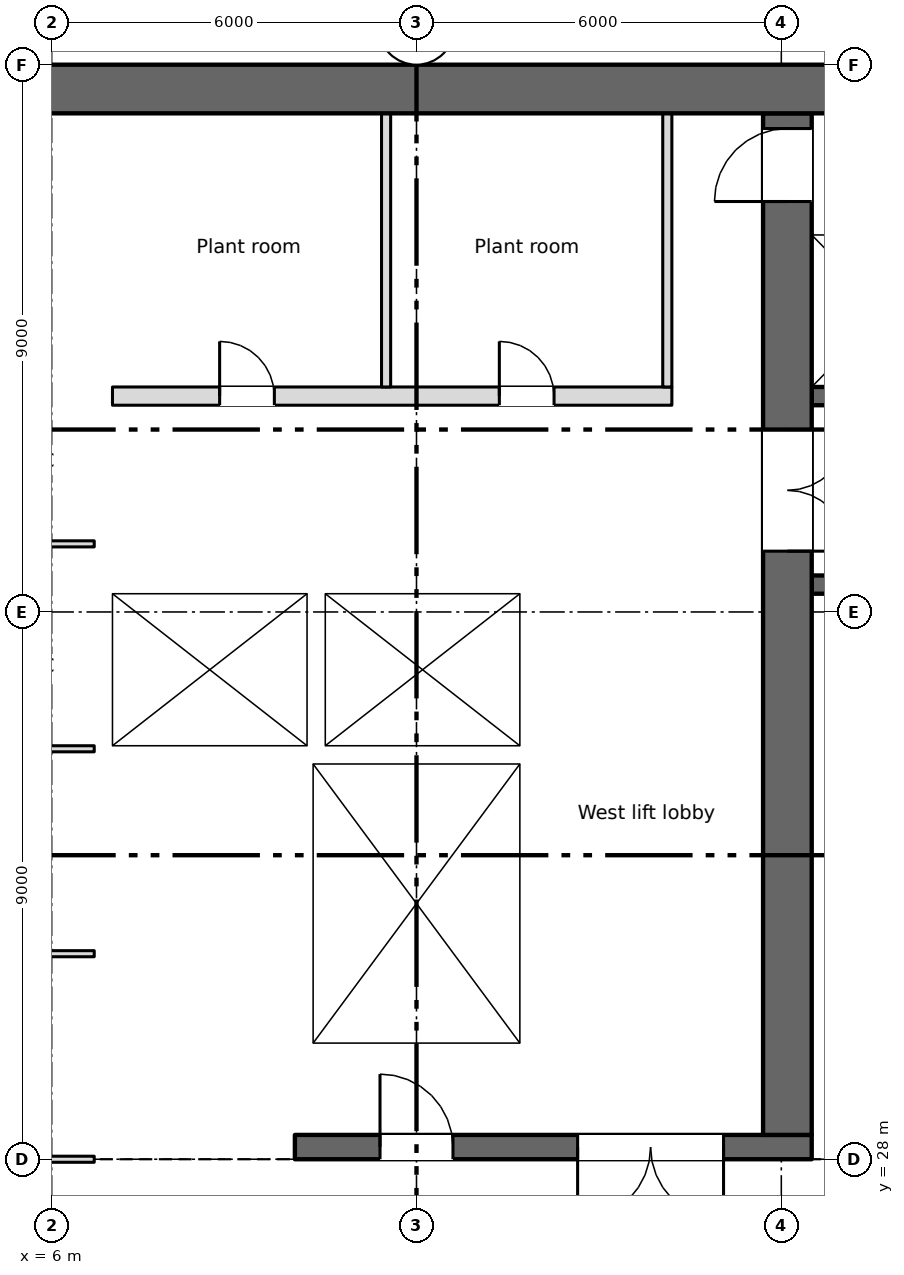
"""IFC4 building model, lengths in metres.
Left out: names, types, materials, properties, quantities, classifications, styles, units other than length and angle.
Written with IfcOpenShell. Run it as: python <this file> out.ifc"""

import sys

from ifc_helpers import new_model, si_unit, direction, frame, frame_2d, origin, place, context, subcontext, project, spatial, rectangle, extrude, element, fill, save


model = new_model("IFC4")
c1 = context("Model", 3, precision=1e-05, world=origin(), true_north=direction((0.0, 1.0)))
c2 = subcontext(c1, "Body", "Model", "MODEL_VIEW")
j1 = project(units=[si_unit("LENGTHUNIT", "METRE"), si_unit("PLANEANGLEUNIT", "RADIAN")], contexts=[c1])
p1 = place(None, origin())
s1 = spatial("IfcSite", under=j1, at=p1, CompositionType="ELEMENT")
p2 = place(p1, origin())
s2 = spatial("IfcBuilding", under=s1, at=p2, CompositionType="ELEMENT")
p3 = place(p2, frame((0.0, 0.0, 158.75)))
s3 = spatial("IfcBuildingStorey", under=s2, at=p3, CompositionType="ELEMENT", Elevation=158.75)
p4 = place(p3, frame((5.55, 45.6, 0.0), z_axis=(0.0, 0.0, 1.0), x_axis=(1.0, 0.0, 0.0)))
e1 = element("IfcWall", 1, at=p4, inside=s3, PredefinedType="SHEAR", context=c2, shape_type="SweptSolid", body=[
    extrude(rectangle(XDim=60.9, YDim=0.8, at=frame_2d((30.45, 0.0))), origin(), (0.0, 0.0, 1.0), 7.2),
])
p5 = place(p3, frame((6.85, 28.0, 0.0), z_axis=(0.0, 0.0, 1.0), x_axis=(0.0, 1.0, 0.0)))
e2 = element("IfcWall", 2, at=p5, inside=s3, PredefinedType="SHEAR", context=c2, shape_type="SweptSolid", body=[
    extrude(rectangle(XDim=0.4, YDim=0.3, at=frame_2d((0.2, 0.0))), origin(), (0.0, 0.0, 1.0), 7.2),
])
p6 = place(p3, frame((10.0, 28.2, 0.0), z_axis=(0.0, 0.0, 1.0), x_axis=(1.0, 0.0, 0.0)))
e3 = element("IfcWall", 3, at=p6, inside=s3, PredefinedType="SHEAR", context=c2, shape_type="SweptSolid", body=[
    extrude(rectangle(XDim=8.5, YDim=0.4, at=frame_2d((4.25, 0.0))), origin(), (0.0, 0.0, 1.0), 7.2),
])
p7 = place(p6, frame((1.4, 0.0, 0.0)))
e4 = element("IfcOpeningElement", 4, at=p7, cuts=e3, PredefinedType="OPENING", context=c2, shape_type="SweptSolid", body=[
    extrude(rectangle(XDim=1.2, YDim=2.1, at=frame_2d((0.6, 1.05))), frame((0.0, 0.21, 0.0), z_axis=(0.0, -1.0, 0.0), x_axis=(1.0, 0.0, 0.0)), (0.0, 0.0, 1.0), 0.42),
])
p8 = place(p6, frame((4.65, 0.0, 0.0)))
e5 = element("IfcOpeningElement", 5, at=p8, cuts=e3, PredefinedType="OPENING", context=c2, shape_type="SweptSolid", body=[
    extrude(rectangle(XDim=2.4, YDim=2.1, at=frame_2d((1.2, 1.05))), frame((0.0, 0.21, 0.0), z_axis=(0.0, -1.0, 0.0), x_axis=(1.0, 0.0, 0.0)), (0.0, 0.0, 1.0), 0.42),
])
p9 = place(p3, frame((6.85, 28.4, 0.0), z_axis=(0.0, 0.0, 1.0), x_axis=(0.0, 1.0, 0.0)))
e6 = element("IfcWall", 6, at=p9, inside=s3, PredefinedType="SHEAR", context=c2, shape_type="SweptSolid", body=[
    extrude(rectangle(XDim=16.8, YDim=0.3, at=frame_2d((8.4, 0.0))), origin(), (0.0, 0.0, 1.0), 7.2),
])
p10 = place(p3, frame((18.1, 28.4, 0.0), z_axis=(0.0, 0.0, 1.0), x_axis=(0.0, 1.0, 0.0)))
e7 = element("IfcWall", 7, at=p10, inside=s3, PredefinedType="SHEAR", context=c2, shape_type="SweptSolid", body=[
    extrude(rectangle(XDim=16.8, YDim=0.8, at=frame_2d((8.4, 0.0))), origin(), (0.0, 0.0, 1.0), 7.2),
])
p11 = place(p10, frame((9.6, 0.0, 0.0)))
e8 = element("IfcOpeningElement", 8, at=p11, cuts=e7, PredefinedType="OPENING", context=c2, shape_type="SweptSolid", body=[
    extrude(rectangle(XDim=2.0, YDim=2.1, at=frame_2d((1.0, 1.05))), frame((0.0, 0.41, 0.0), z_axis=(0.0, -1.0, 0.0), x_axis=(1.0, 0.0, 0.0)), (0.0, 0.0, 1.0), 0.82),
])
p12 = place(p10, frame((15.35, 0.0, 0.0)))
e9 = element("IfcOpeningElement", 9, at=p12, cuts=e7, PredefinedType="OPENING", context=c2, shape_type="SweptSolid", body=[
    extrude(rectangle(XDim=1.2, YDim=2.1, at=frame_2d((0.6, 1.05))), frame((0.0, 0.41, 0.0), z_axis=(0.0, -1.0, 0.0), x_axis=(1.0, 0.0, 0.0)), (0.0, 0.0, 1.0), 0.82),
])
for number, where, z_axis, x_axis in (
    (10, (10.15, 28.4, 0.0), (0.0, 0.0, 1.0), (0.0, 1.0, 0.0)),
    (11, (13.85, 28.4, 0.0), (0.0, 0.0, 1.0), (0.0, 1.0, 0.0)),
):
    element("IfcWall", number, at=place(p3, frame(where, z_axis=z_axis, x_axis=x_axis)), inside=s3, PredefinedType="SHEAR", context=c2, shape_type="SweptSolid", body=[
        extrude(rectangle(XDim=6.1, YDim=0.3, at=frame_2d((3.05, 0.0))), origin(), (0.0, 0.0, 1.0), 7.2),
    ])
p13 = place(p3, frame((7.0, 34.65, 0.0), z_axis=(0.0, 0.0, 1.0), x_axis=(1.0, 0.0, 0.0)))
e12 = element("IfcWall", 12, at=p13, inside=s3, PredefinedType="SHEAR", context=c2, shape_type="SweptSolid", body=[
    extrude(rectangle(XDim=7.0, YDim=0.3, at=frame_2d((3.5, 0.0))), origin(), (0.0, 0.0, 1.0), 7.2),
])
p14 = place(p3, frame((18.5, 34.65, 0.0), z_axis=(0.0, 0.0, 1.0), x_axis=(1.0, 0.0, 0.0)))
e13 = element("IfcWall", 13, at=p14, inside=s3, PredefinedType="SHEAR", context=c2, shape_type="SweptSolid", body=[
    extrude(rectangle(XDim=12.2, YDim=0.3, at=frame_2d((6.1, 0.0))), origin(), (0.0, 0.0, 1.0), 7.2),
])
p15 = place(p14, frame((9.8, 0.0, 0.0)))
e14 = element("IfcOpeningElement", 14, at=p15, cuts=e13, PredefinedType="OPENING", context=c2, shape_type="SweptSolid", body=[
    extrude(rectangle(XDim=1.1, YDim=2.1, at=frame_2d((0.55, 1.05))), frame((0.0, 0.16, 0.0), z_axis=(0.0, -1.0, 0.0), x_axis=(1.0, 0.0, 0.0)), (0.0, 0.0, 1.0), 0.32),
])
p16 = place(p3, frame((7.0, 37.45, 0.0), z_axis=(0.0, 0.0, 1.0), x_axis=(1.0, 0.0, 0.0)))
e15 = element("IfcWall", 15, at=p16, inside=s3, PredefinedType="SHEAR", context=c2, shape_type="SweptSolid", body=[
    extrude(rectangle(XDim=7.0, YDim=0.3, at=frame_2d((3.5, 0.0))), origin(), (0.0, 0.0, 1.0), 7.2),
])
p17 = place(p3, frame((30.7, 37.45, 0.0), z_axis=(0.0, 0.0, 1.0), x_axis=(-1.0, 0.0, 0.0)))
e16 = element("IfcWall", 16, at=p17, inside=s3, PredefinedType="SHEAR", context=c2, shape_type="SweptSolid", body=[
    extrude(rectangle(XDim=12.2, YDim=0.3, at=frame_2d((6.1, 0.0))), origin(), (0.0, 0.0, 1.0), 7.2),
])
p18 = place(p17, frame((7.4, 0.0, 0.0)))
e17 = element("IfcOpeningElement", 17, at=p18, cuts=e16, PredefinedType="OPENING", context=c2, shape_type="SweptSolid", body=[
    extrude(rectangle(XDim=0.9, YDim=2.1, at=frame_2d((0.45, 1.05))), frame((0.0, 0.16, 0.0), z_axis=(0.0, -1.0, 0.0), x_axis=(1.0, 0.0, 0.0)), (0.0, 0.0, 1.0), 0.32),
])
p19 = place(p3, frame((13.85, 34.8, 0.0), z_axis=(0.0, 0.0, 1.0), x_axis=(0.0, 1.0, 0.0)))
e18 = element("IfcWall", 18, at=p19, inside=s3, PredefinedType="SHEAR", context=c2, shape_type="SweptSolid", body=[
    extrude(rectangle(XDim=2.5, YDim=0.3, at=frame_2d((1.25, 0.0))), origin(), (0.0, 0.0, 1.0), 7.2),
])
p20 = place(p3, frame((18.5, 40.55, 0.0), z_axis=(0.0, 0.0, 1.0), x_axis=(1.0, 0.0, 0.0)))
e19 = element("IfcWall", 19, at=p20, inside=s3, PredefinedType="SHEAR", context=c2, shape_type="SweptSolid", body=[
    extrude(rectangle(XDim=41.0, YDim=0.3, at=frame_2d((20.5, 0.0))), origin(), (0.0, 0.0, 1.0), 7.2),
])
p21 = place(p20, frame((15.9, 0.0, 0.0)))
e20 = element("IfcOpeningElement", 20, at=p21, cuts=e19, PredefinedType="OPENING", context=c2, shape_type="SweptSolid", body=[
    extrude(rectangle(XDim=0.9, YDim=2.1, at=frame_2d((0.45, 1.05))), frame((0.0, 0.16, 0.0), z_axis=(0.0, -1.0, 0.0), x_axis=(1.0, 0.0, 0.0)), (0.0, 0.0, 1.0), 0.32),
])
p22 = place(p20, frame((21.4, 0.0, 0.0)))
e21 = element("IfcOpeningElement", 21, at=p22, cuts=e19, PredefinedType="OPENING", context=c2, shape_type="SweptSolid", body=[
    extrude(rectangle(XDim=0.9, YDim=2.1, at=frame_2d((0.45, 1.05))), frame((0.0, 0.16, 0.0), z_axis=(0.0, -1.0, 0.0), x_axis=(1.0, 0.0, 0.0)), (0.0, 0.0, 1.0), 0.32),
])
p23 = place(p20, frame((0.675, 0.0, 0.0)))
e22 = element("IfcOpeningElement", 22, at=p23, cuts=e19, PredefinedType="OPENING", context=c2, shape_type="SweptSolid", body=[
    extrude(rectangle(XDim=1.1, YDim=2.1, at=frame_2d((0.55, 1.05))), frame((0.0, 0.16, 0.0), z_axis=(0.0, -1.0, 0.0), x_axis=(1.0, 0.0, 0.0)), (0.0, 0.0, 1.0), 0.32),
])
p24 = place(p20, frame((3.425, 0.0, 0.0)))
e23 = element("IfcOpeningElement", 23, at=p24, cuts=e19, PredefinedType="OPENING", context=c2, shape_type="SweptSolid", body=[
    extrude(rectangle(XDim=1.1, YDim=2.1, at=frame_2d((0.55, 1.05))), frame((0.0, 0.16, 0.0), z_axis=(0.0, -1.0, 0.0), x_axis=(1.0, 0.0, 0.0)), (0.0, 0.0, 1.0), 0.32),
])
p25 = place(p20, frame((5.575, 0.0, 0.0)))
e24 = element("IfcOpeningElement", 24, at=p25, cuts=e19, PredefinedType="OPENING", context=c2, shape_type="SweptSolid", body=[
    extrude(rectangle(XDim=1.1, YDim=2.1, at=frame_2d((0.55, 1.05))), frame((0.0, 0.16, 0.0), z_axis=(0.0, -1.0, 0.0), x_axis=(1.0, 0.0, 0.0)), (0.0, 0.0, 1.0), 0.32),
])
p26 = place(p20, frame((6.775, 0.0, 0.0)))
e25 = element("IfcOpeningElement", 25, at=p26, cuts=e19, PredefinedType="OPENING", context=c2, shape_type="SweptSolid", body=[
    extrude(rectangle(XDim=1.1, YDim=2.1, at=frame_2d((0.55, 1.05))), frame((0.0, 0.16, 0.0), z_axis=(0.0, -1.0, 0.0), x_axis=(1.0, 0.0, 0.0)), (0.0, 0.0, 1.0), 0.32),
])
p27 = place(p20, frame((8.325, 0.0, 0.0)))
e26 = element("IfcOpeningElement", 26, at=p27, cuts=e19, PredefinedType="OPENING", context=c2, shape_type="SweptSolid", body=[
    extrude(rectangle(XDim=1.1, YDim=2.1, at=frame_2d((0.55, 1.05))), frame((0.0, 0.16, 0.0), z_axis=(0.0, -1.0, 0.0), x_axis=(1.0, 0.0, 0.0)), (0.0, 0.0, 1.0), 0.32),
])
p28 = place(p20, frame((9.525, 0.0, 0.0)))
e27 = element("IfcOpeningElement", 27, at=p28, cuts=e19, PredefinedType="OPENING", context=c2, shape_type="SweptSolid", body=[
    extrude(rectangle(XDim=1.1, YDim=2.1, at=frame_2d((0.55, 1.05))), frame((0.0, 0.16, 0.0), z_axis=(0.0, -1.0, 0.0), x_axis=(1.0, 0.0, 0.0)), (0.0, 0.0, 1.0), 0.32),
])
p29 = place(p20, frame((11.075, 0.0, 0.0)))
e28 = element("IfcOpeningElement", 28, at=p29, cuts=e19, PredefinedType="OPENING", context=c2, shape_type="SweptSolid", body=[
    extrude(rectangle(XDim=1.1, YDim=2.1, at=frame_2d((0.55, 1.05))), frame((0.0, 0.16, 0.0), z_axis=(0.0, -1.0, 0.0), x_axis=(1.0, 0.0, 0.0)), (0.0, 0.0, 1.0), 0.32),
])
p30 = place(p20, frame((12.275, 0.0, 0.0)))
e29 = element("IfcOpeningElement", 29, at=p30, cuts=e19, PredefinedType="OPENING", context=c2, shape_type="SweptSolid", body=[
    extrude(rectangle(XDim=1.1, YDim=2.1, at=frame_2d((0.55, 1.05))), frame((0.0, 0.16, 0.0), z_axis=(0.0, -1.0, 0.0), x_axis=(1.0, 0.0, 0.0)), (0.0, 0.0, 1.0), 0.32),
])
p31 = place(p20, frame((25.425, 0.0, 0.0)))
e30 = element("IfcOpeningElement", 30, at=p31, cuts=e19, PredefinedType="OPENING", context=c2, shape_type="SweptSolid", body=[
    extrude(rectangle(XDim=1.1, YDim=2.1, at=frame_2d((0.55, 1.05))), frame((0.0, 0.16, 0.0), z_axis=(0.0, -1.0, 0.0), x_axis=(1.0, 0.0, 0.0)), (0.0, 0.0, 1.0), 0.32),
])
p32 = place(p20, frame((28.175, 0.0, 0.0)))
e31 = element("IfcOpeningElement", 31, at=p32, cuts=e19, PredefinedType="OPENING", context=c2, shape_type="SweptSolid", body=[
    extrude(rectangle(XDim=1.1, YDim=2.1, at=frame_2d((0.55, 1.05))), frame((0.0, 0.16, 0.0), z_axis=(0.0, -1.0, 0.0), x_axis=(1.0, 0.0, 0.0)), (0.0, 0.0, 1.0), 0.32),
])
p33 = place(p20, frame((30.325, 0.0, 0.0)))
e32 = element("IfcOpeningElement", 32, at=p33, cuts=e19, PredefinedType="OPENING", context=c2, shape_type="SweptSolid", body=[
    extrude(rectangle(XDim=1.1, YDim=2.1, at=frame_2d((0.55, 1.05))), frame((0.0, 0.16, 0.0), z_axis=(0.0, -1.0, 0.0), x_axis=(1.0, 0.0, 0.0)), (0.0, 0.0, 1.0), 0.32),
])
p34 = place(p20, frame((31.525, 0.0, 0.0)))
e33 = element("IfcOpeningElement", 33, at=p34, cuts=e19, PredefinedType="OPENING", context=c2, shape_type="SweptSolid", body=[
    extrude(rectangle(XDim=1.1, YDim=2.1, at=frame_2d((0.55, 1.05))), frame((0.0, 0.16, 0.0), z_axis=(0.0, -1.0, 0.0), x_axis=(1.0, 0.0, 0.0)), (0.0, 0.0, 1.0), 0.32),
])
p35 = place(p20, frame((33.075, 0.0, 0.0)))
e34 = element("IfcOpeningElement", 34, at=p35, cuts=e19, PredefinedType="OPENING", context=c2, shape_type="SweptSolid", body=[
    extrude(rectangle(XDim=1.1, YDim=2.1, at=frame_2d((0.55, 1.05))), frame((0.0, 0.16, 0.0), z_axis=(0.0, -1.0, 0.0), x_axis=(1.0, 0.0, 0.0)), (0.0, 0.0, 1.0), 0.32),
])
p36 = place(p20, frame((34.275, 0.0, 0.0)))
e35 = element("IfcOpeningElement", 35, at=p36, cuts=e19, PredefinedType="OPENING", context=c2, shape_type="SweptSolid", body=[
    extrude(rectangle(XDim=1.1, YDim=2.1, at=frame_2d((0.55, 1.05))), frame((0.0, 0.16, 0.0), z_axis=(0.0, -1.0, 0.0), x_axis=(1.0, 0.0, 0.0)), (0.0, 0.0, 1.0), 0.32),
])
p37 = place(p20, frame((36.375, 0.0, 0.0)))
e36 = element("IfcOpeningElement", 36, at=p37, cuts=e19, PredefinedType="OPENING", context=c2, shape_type="SweptSolid", body=[
    extrude(rectangle(XDim=1.2, YDim=2.1, at=frame_2d((0.6, 1.05))), frame((0.0, 0.16, 0.0), z_axis=(0.0, -1.0, 0.0), x_axis=(1.0, 0.0, 0.0)), (0.0, 0.0, 1.0), 0.32),
])
p38 = place(p20, frame((39.15, 0.0, 0.0)))
e37 = element("IfcOpeningElement", 37, at=p38, cuts=e19, PredefinedType="OPENING", context=c2, shape_type="SweptSolid", body=[
    extrude(rectangle(XDim=1.2, YDim=2.1, at=frame_2d((0.6, 1.05))), frame((0.0, 0.16, 0.0), z_axis=(0.0, -1.0, 0.0), x_axis=(1.0, 0.0, 0.0)), (0.0, 0.0, 1.0), 0.32),
])
p39 = place(p3, frame((18.5, 43.35, 0.0), z_axis=(0.0, 0.0, 1.0), x_axis=(1.0, 0.0, 0.0)))
e38 = element("IfcWall", 38, at=p39, inside=s3, PredefinedType="SHEAR", context=c2, shape_type="SweptSolid", body=[
    extrude(rectangle(XDim=41.0, YDim=0.3, at=frame_2d((20.5, 0.0))), origin(), (0.0, 0.0, 1.0), 7.2),
])
p40 = place(p3, frame((7.0, 40.55, 0.0), z_axis=(0.0, 0.0, 1.0), x_axis=(1.0, 0.0, 0.0)))
e39 = element("IfcWall", 39, at=p40, inside=s3, PredefinedType="PARTITIONING", context=c2, shape_type="SweptSolid", body=[
    extrude(rectangle(XDim=9.2, YDim=0.3, at=frame_2d((4.6, 0.0))), origin(), (0.0, 0.0, 1.0), 7.2),
])
p41 = place(p40, frame((1.762, 0.0, 0.0)))
e40 = element("IfcOpeningElement", 40, at=p41, cuts=e39, PredefinedType="OPENING", context=c2, shape_type="SweptSolid", body=[
    extrude(rectangle(XDim=0.9, YDim=2.1, at=frame_2d((0.45, 1.05))), frame((0.0, 0.16, 0.0), z_axis=(0.0, -1.0, 0.0), x_axis=(1.0, 0.0, 0.0)), (0.0, 0.0, 1.0), 0.32),
])
p42 = place(p40, frame((6.363, 0.0, 0.0)))
e41 = element("IfcOpeningElement", 41, at=p42, cuts=e39, PredefinedType="OPENING", context=c2, shape_type="SweptSolid", body=[
    extrude(rectangle(XDim=0.9, YDim=2.1, at=frame_2d((0.45, 1.05))), frame((0.0, 0.16, 0.0), z_axis=(0.0, -1.0, 0.0), x_axis=(1.0, 0.0, 0.0)), (0.0, 0.0, 1.0), 0.32),
])
p43 = place(p3, frame((10.35, 34.8, 0.0), z_axis=(0.0, 0.0, 1.0), x_axis=(0.0, 1.0, 0.0)))
e42 = element("IfcWall", 42, at=p43, inside=s3, PredefinedType="SHEAR", context=c2, shape_type="SweptSolid", body=[
    extrude(rectangle(XDim=2.5, YDim=0.3, at=frame_2d((1.25, 0.0))), origin(), (0.0, 0.0, 1.0), 7.2),
])
for number, where, z_axis, x_axis in (
    (43, (16.125, 40.7, 0.0), (0.0, 0.0, 1.0), (0.0, 1.0, 0.0)),
    (44, (11.5, 40.7, 0.0), (0.0, 0.0, 1.0), (0.0, 1.0, 0.0)),
):
    element("IfcWall", number, at=place(p3, frame(where, z_axis=z_axis, x_axis=x_axis)), inside=s3, PredefinedType="PARTITIONING", context=c2, shape_type="SweptSolid", body=[
        extrude(rectangle(XDim=4.5, YDim=0.15, at=frame_2d((2.25, 0.0))), origin(), (0.0, 0.0, 1.0), 7.2),
    ])
p44 = place(p3, frame((0.7, 28.0, 0.0), z_axis=(0.0, 0.0, 1.0), x_axis=(1.0, 0.0, 0.0)))
e45 = element("IfcWall", 45, at=p44, inside=s3, PredefinedType="PARTITIONING", context=c2, shape_type="SweptSolid", body=[
    extrude(rectangle(XDim=6.0, YDim=0.1, at=frame_2d((3.0, 0.0))), origin(), (0.0, 0.0, 1.0), 7.2),
])
p45 = place(p44, frame((0.2, 0.0, 0.0)))
e46 = element("IfcOpeningElement", 46, at=p45, cuts=e45, PredefinedType="OPENING", context=c2, shape_type="SweptSolid", body=[
    extrude(rectangle(XDim=1.8, YDim=2.1, at=frame_2d((0.9, 1.05))), frame((0.0, 0.06, 0.0), z_axis=(0.0, -1.0, 0.0), x_axis=(1.0, 0.0, 0.0)), (0.0, 0.0, 1.0), 0.12),
])
for number, where, z_axis, x_axis in (
    (47, (3.15, 31.38, 0.0), (0.0, 0.0, 1.0), (1.0, 0.0, 0.0)),
    (48, (3.15, 34.75, 0.0), (0.0, 0.0, 1.0), (1.0, 0.0, 0.0)),
    (49, (3.15, 38.12, 0.0), (0.0, 0.0, 1.0), (1.0, 0.0, 0.0)),
):
    element("IfcWall", number, at=place(p3, frame(where, z_axis=z_axis, x_axis=x_axis)), inside=s3, PredefinedType="PARTITIONING", context=c2, shape_type="SweptSolid", body=[
        extrude(rectangle(XDim=3.55, YDim=0.1, at=frame_2d((1.775, 0.0))), origin(), (0.0, 0.0, 1.0), 7.2),
    ])
p46 = place(p41, origin())
e50 = element("IfcDoor", 50, at=p46, inside=s3, OperationType="SINGLE_SWING_LEFT", PredefinedType="DOOR", context=c2, shape_type="SweptSolid", body=[
    extrude(rectangle(XDim=0.9, YDim=2.1, at=frame_2d((0.45, 1.05))), frame((0.0, 0.025, 0.0), z_axis=(0.0, -1.0, 0.0), x_axis=(1.0, 0.0, 0.0)), (0.0, 0.0, 1.0), 0.05),
])
fill(e40, e50)
p47 = place(p42, origin())
e51 = element("IfcDoor", 51, at=p47, inside=s3, OperationType="SINGLE_SWING_LEFT", PredefinedType="DOOR", context=c2, shape_type="SweptSolid", body=[
    extrude(rectangle(XDim=0.9, YDim=2.1, at=frame_2d((0.45, 1.05))), frame((0.0, 0.025, 0.0), z_axis=(0.0, -1.0, 0.0), x_axis=(1.0, 0.0, 0.0)), (0.0, 0.0, 1.0), 0.05),
])
fill(e41, e51)
p48 = place(p7, origin())
e52 = element("IfcDoor", 52, at=p48, inside=s3, OperationType="SINGLE_SWING_LEFT", PredefinedType="DOOR", context=c2, shape_type="SweptSolid", body=[
    extrude(rectangle(XDim=1.2, YDim=2.1, at=frame_2d((0.6, 1.05))), frame((0.0, 0.025, 0.0), z_axis=(0.0, -1.0, 0.0), x_axis=(1.0, 0.0, 0.0)), (0.0, 0.0, 1.0), 0.05),
])
fill(e4, e52)
p49 = place(p8, origin())
e53 = element("IfcDoor", 53, at=p49, inside=s3, OperationType="DOUBLE_DOOR_SINGLE_SWING", PredefinedType="DOOR", context=c2, shape_type="SweptSolid", body=[
    extrude(rectangle(XDim=2.4, YDim=2.1, at=frame_2d((1.2, 1.05))), frame((0.0, 0.025, 0.0), z_axis=(0.0, -1.0, 0.0), x_axis=(1.0, 0.0, 0.0)), (0.0, 0.0, 1.0), 0.05),
])
fill(e5, e53)
p50 = place(p11, origin())
e54 = element("IfcDoor", 54, at=p50, inside=s3, OperationType="DOUBLE_DOOR_SINGLE_SWING", PredefinedType="DOOR", context=c2, shape_type="SweptSolid", body=[
    extrude(rectangle(XDim=2.0, YDim=2.1, at=frame_2d((1.0, 1.05))), frame((0.0, 0.025, 0.0), z_axis=(0.0, -1.0, 0.0), x_axis=(1.0, 0.0, 0.0)), (0.0, 0.0, 1.0), 0.05),
])
fill(e8, e54)
p51 = place(p12, origin())
e55 = element("IfcDoor", 55, at=p51, inside=s3, OperationType="SINGLE_SWING_LEFT", PredefinedType="DOOR", context=c2, shape_type="SweptSolid", body=[
    extrude(rectangle(XDim=1.2, YDim=2.1, at=frame_2d((0.6, 1.05))), frame((0.0, 0.025, 0.0), z_axis=(0.0, -1.0, 0.0), x_axis=(1.0, 0.0, 0.0)), (0.0, 0.0, 1.0), 0.05),
])
fill(e9, e55)
save(model, sys.argv[1])
